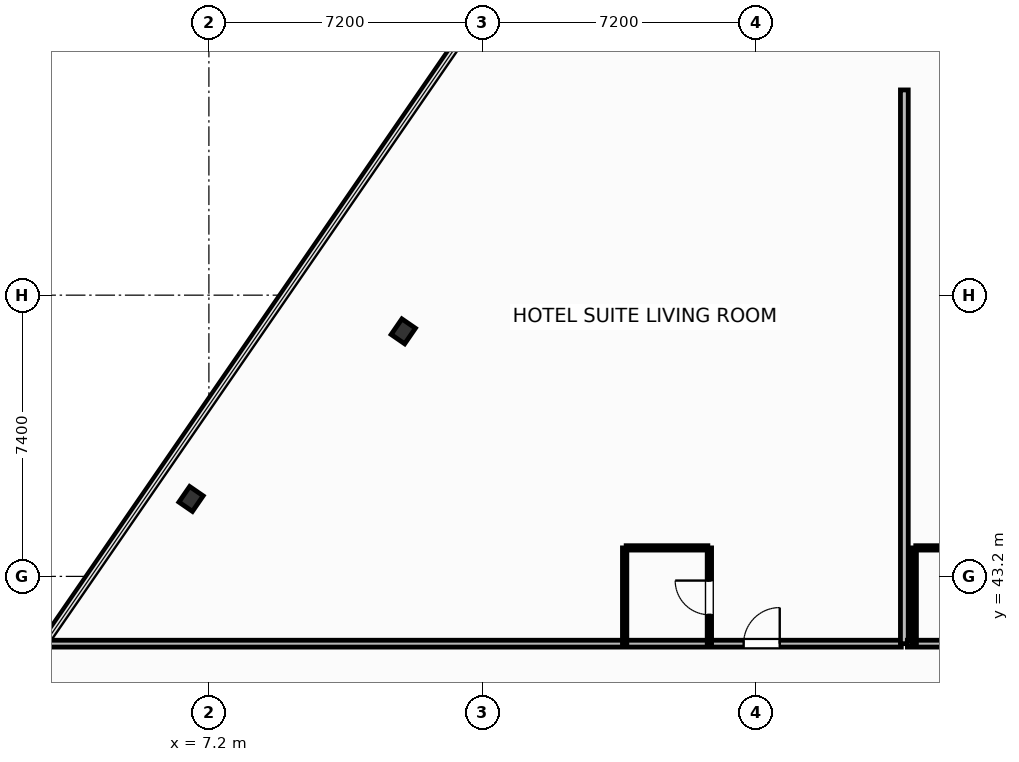
"""IFC4 building model, lengths in metres.
Left out: names, types, materials, properties, quantities, classifications, styles, units other than length and angle.
Written with IfcOpenShell. Run it as: python <this file> out.ifc"""

import sys

from ifc_helpers import new_model, si_unit, direction, frame, frame_2d, origin, origin_2d, place, context, subcontext, project, spatial, rectangle, i_section, extrude, element, fill, save


model = new_model("IFC4")
c1 = context("Model", 3, precision=1e-05, world=origin(), true_north=direction((0.0, 1.0)))
c2 = subcontext(c1, "Body", "Model", "MODEL_VIEW")
j1 = project(units=[si_unit("LENGTHUNIT", "METRE"), si_unit("PLANEANGLEUNIT", "RADIAN")], contexts=[c1])
p1 = place(None, origin())
s1 = spatial("IfcSite", under=j1, at=p1, CompositionType="ELEMENT")
p2 = place(p1, origin())
s2 = spatial("IfcBuilding", under=s1, at=p2, CompositionType="ELEMENT")
p3 = place(p2, frame((0.0, 0.0, 30.7)))
s3 = spatial("IfcBuildingStorey", under=s2, at=p3, CompositionType="ELEMENT", Elevation=30.7)
for number, where, z_axis, x_axis in (
    (1, (12.315, 49.647, 0.0), (0.0, 0.0, 1.0), (0.824, -0.567, 0.0)),
    (2, (6.73, 45.238, 0.0), (0.0, 0.0, 1.0), (0.824, -0.567, 0.0)),
):
    element("IfcColumn", number, at=place(p3, frame(where, z_axis=z_axis, x_axis=x_axis)), inside=s3, PredefinedType="COLUMN", context=c2, shape_type="SweptSolid", body=[
        extrude(i_section(OverallWidth=0.432, OverallDepth=0.498, WebThickness=0.056, FlangeThickness=0.089, FilletRadius=0.025, at=origin_2d()), origin(), (0.0, 0.0, 1.0), 3.7),
    ])
p4 = place(p3, frame((44.882, 51.962, 0.0), z_axis=(0.0, 0.0, 1.0), x_axis=(-0.823534427573, 0.567266292497, 0.0)))
e3 = element("IfcWall", 3, at=p4, inside=s3, PredefinedType="SOLIDWALL", context=c2, shape_type="SweptSolid", body=[
    extrude(rectangle(XDim=23.147, YDim=0.22, at=frame_2d((11.574, 0.0))), origin(), (0.0, 0.0, 1.0), 2.73),
])
p5 = place(p4, frame((10.749, 0.0, 0.8)))
e4 = element("IfcOpeningElement", 4, at=p5, cuts=e3, PredefinedType="OPENING", context=c2, shape_type="SweptSolid", body=[
    extrude(rectangle(XDim=1.65, YDim=1.65, at=frame_2d((0.825, 0.825))), frame((0.0, 0.12, 0.0), z_axis=(0.0, -1.0, 0.0), x_axis=(1.0, 0.0, 0.0)), (0.0, 0.0, 1.0), 0.24),
])
p6 = place(p3, frame((2.921, 41.43, 0.0), z_axis=(0.0, 0.0, 1.0), x_axis=(1.0, 0.0, 0.0)))
e5 = element("IfcWall", 5, at=p6, inside=s3, PredefinedType="PARTITIONING", context=c2, shape_type="SweptSolid", body=[
    extrude(rectangle(XDim=22.499, YDim=0.18, at=frame_2d((11.25, 0.0))), origin(), (0.0, 0.0, 1.0), 3.45),
])
p7 = place(p6, frame((18.35, 0.0, 0.0)))
e6 = element("IfcOpeningElement", 6, at=p7, cuts=e5, PredefinedType="OPENING", context=c2, shape_type="SweptSolid", body=[
    extrude(rectangle(XDim=0.95, YDim=2.15, at=frame_2d((0.475, 1.075))), frame((0.0, 0.1, 0.0), z_axis=(0.0, -1.0, 0.0), x_axis=(1.0, 0.0, 0.0)), (0.0, 0.0, 1.0), 0.2),
])
p8 = place(p3, frame((18.18, 43.95, 0.0), z_axis=(0.0, 0.0, 1.0), x_axis=(1.0, 0.0, 0.0)))
e7 = element("IfcWall", 7, at=p8, inside=s3, PredefinedType="PARTITIONING", context=c2, shape_type="SweptSolid", body=[
    extrude(rectangle(XDim=2.15, YDim=0.115, at=frame_2d((1.075, 0.0))), origin(), (0.0, 0.0, 1.0), 3.45),
])
p9 = place(p3, frame((20.37, 41.43, 0.0), z_axis=(0.0, 0.0, 1.0), x_axis=(0.0, 1.0, 0.0)))
e8 = element("IfcWall", 8, at=p9, inside=s3, PredefinedType="PARTITIONING", context=c2, shape_type="SweptSolid", body=[
    extrude(rectangle(XDim=2.52, YDim=0.115, at=frame_2d((1.26, 0.0))), origin(), (0.0, 0.0, 1.0), 3.45),
])
p10 = place(p9, frame((0.76, 0.0, 0.0)))
e9 = element("IfcOpeningElement", 9, at=p10, cuts=e8, PredefinedType="OPENING", context=c2, shape_type="SweptSolid", body=[
    extrude(rectangle(XDim=0.9, YDim=2.05, at=frame_2d((0.45, 1.025))), frame((0.0, 0.067, 0.0), z_axis=(0.0, -1.0, 0.0), x_axis=(1.0, 0.0, 0.0)), (0.0, 0.0, 1.0), 0.135),
])
p11 = place(p3, frame((18.14, 41.43, 0.0), z_axis=(0.0, 0.0, 1.0), x_axis=(0.0, 1.0, 0.0)))
e10 = element("IfcWall", 10, at=p11, inside=s3, PredefinedType="PARTITIONING", context=c2, shape_type="SweptSolid", body=[
    extrude(rectangle(XDim=2.52, YDim=0.115, at=frame_2d((1.26, 0.0))), origin(), (0.0, 0.0, 1.0), 3.45),
])
p12 = place(p3, frame((25.5, 41.43, 0.0), z_axis=(0.0, 0.0, 1.0), x_axis=(0.0, 1.0, 0.0)))
e11 = element("IfcWall", 11, at=p12, inside=s3, PredefinedType="PARTITIONING", context=c2, shape_type="SweptSolid", body=[
    extrude(rectangle(XDim=14.57, YDim=0.205, at=frame_2d((7.285, 0.0))), origin(), (0.0, 0.0, 1.0), 3.45),
])
p13 = place(p3, frame((25.58, 41.43, 0.0), z_axis=(0.0, 0.0, 1.0), x_axis=(1.0, 0.0, 0.0)))
e12 = element("IfcWall", 12, at=p13, inside=s3, PredefinedType="PARTITIONING", context=c2, shape_type="SweptSolid", body=[
    extrude(rectangle(XDim=6.84, YDim=0.18, at=frame_2d((3.42, 0.0))), origin(), (0.0, 0.0, 1.0), 3.45),
])
p14 = place(p13, frame((3.29, 0.0, 0.0)))
e13 = element("IfcOpeningElement", 13, at=p14, cuts=e12, PredefinedType="OPENING", context=c2, shape_type="SweptSolid", body=[
    extrude(rectangle(XDim=0.95, YDim=2.15, at=frame_2d((0.475, 1.075))), frame((0.0, 0.1, 0.0), z_axis=(0.0, -1.0, 0.0), x_axis=(1.0, 0.0, 0.0)), (0.0, 0.0, 1.0), 0.2),
])
p15 = place(p3, frame((25.8, 43.95, 0.0), z_axis=(0.0, 0.0, 1.0), x_axis=(1.0, 0.0, 0.0)))
e14 = element("IfcWall", 14, at=p15, inside=s3, PredefinedType="PARTITIONING", context=c2, shape_type="SweptSolid", body=[
    extrude(rectangle(XDim=2.15, YDim=0.115, at=frame_2d((1.075, 0.0))), origin(), (0.0, 0.0, 1.0), 3.45),
])
p16 = place(p3, frame((25.76, 41.43, 0.0), z_axis=(0.0, 0.0, 1.0), x_axis=(0.0, 1.0, 0.0)))
e15 = element("IfcWall", 15, at=p16, inside=s3, PredefinedType="PARTITIONING", context=c2, shape_type="SweptSolid", body=[
    extrude(rectangle(XDim=2.52, YDim=0.115, at=frame_2d((1.26, 0.0))), origin(), (0.0, 0.0, 1.0), 3.45),
])
p17 = place(p7, origin())
e16 = element("IfcDoor", 16, at=p17, inside=s3, OperationType="SINGLE_SWING_RIGHT", PredefinedType="DOOR", context=c2, shape_type="SweptSolid", body=[
    extrude(rectangle(XDim=0.95, YDim=2.15, at=frame_2d((0.475, 1.075))), frame((0.0, 0.025, 0.0), z_axis=(0.0, -1.0, 0.0), x_axis=(1.0, 0.0, 0.0)), (0.0, 0.0, 1.0), 0.05),
])
fill(e6, e16)
p18 = place(p10, origin())
e17 = element("IfcDoor", 17, at=p18, inside=s3, OperationType="SINGLE_SWING_RIGHT", PredefinedType="DOOR", context=c2, shape_type="SweptSolid", body=[
    extrude(rectangle(XDim=0.9, YDim=2.05, at=frame_2d((0.45, 1.025))), frame((0.0, 0.025, 0.0), z_axis=(0.0, -1.0, 0.0), x_axis=(1.0, 0.0, 0.0)), (0.0, 0.0, 1.0), 0.05),
])
fill(e9, e17)
save(model, sys.argv[1])
